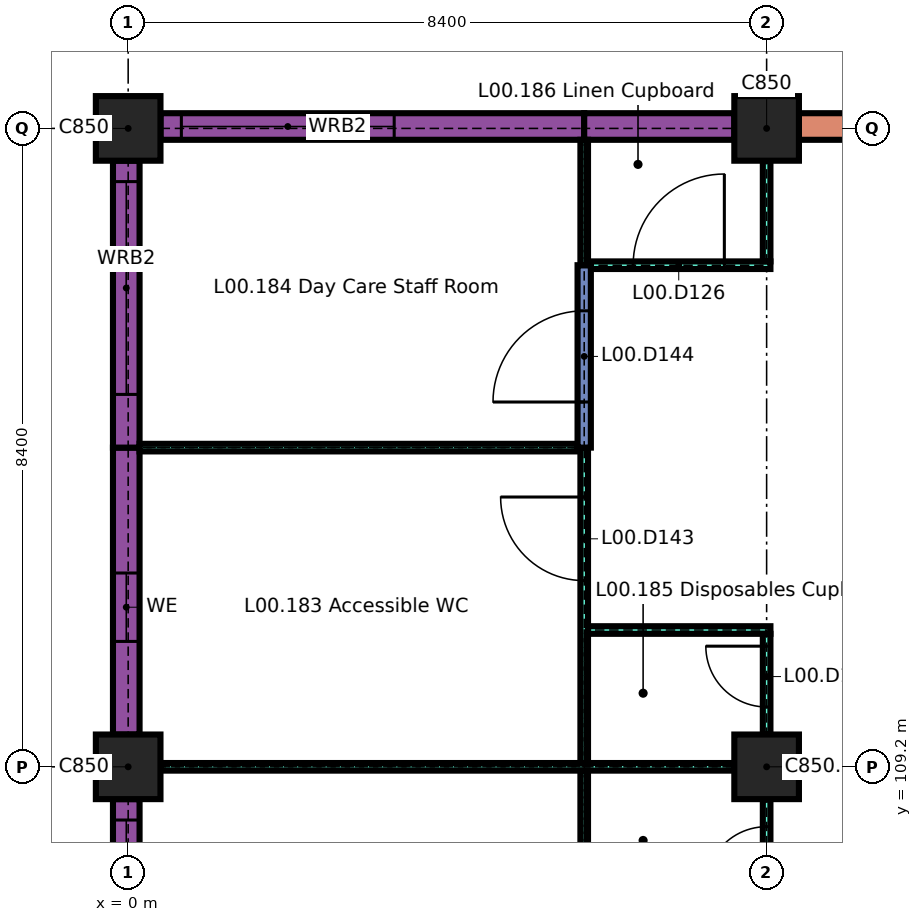
"""IFC4 building model, lengths in metres.
Left out: names, types, materials, properties, quantities, classifications, styles, units other than length and angle.
Written with IfcOpenShell. Run it as: python <this file> out.ifc"""

import sys

from ifc_helpers import new_model, si_unit, direction, frame, frame_2d, origin, origin_2d, place, context, subcontext, project, spatial, rectangle, extrude, element, fill, save


model = new_model("IFC4")
c1 = context("Model", 3, precision=1e-05, world=origin(), true_north=direction((0.0, 1.0)))
c2 = subcontext(c1, "Body", "Model", "MODEL_VIEW")
j1 = project(units=[si_unit("LENGTHUNIT", "METRE"), si_unit("PLANEANGLEUNIT", "RADIAN")], contexts=[c1])
p1 = place(None, origin())
s1 = spatial("IfcSite", under=j1, at=p1, CompositionType="ELEMENT")
p2 = place(p1, origin())
s2 = spatial("IfcBuilding", under=s1, at=p2, CompositionType="ELEMENT")
p3 = place(p2, origin())
s3 = spatial("IfcBuildingStorey", under=s2, at=p3, CompositionType="ELEMENT", Elevation=0.0)
for number, where, z_axis, x_axis in (
    (1, (0.0, 109.2, 0.0), (0.0, 0.0, 1.0), (1.0, 0.0, 0.0)),
    (2, (8.4, 109.2, 0.0), (0.0, 0.0, 1.0), (1.0, 0.0, 0.0)),
    (3, (0.0, 117.6, 0.0), (0.0, 0.0, 1.0), (1.0, 0.0, 0.0)),
    (4, (8.4, 117.6, 0.0), (0.0, 0.0, 1.0), (1.0, 0.0, 0.0)),
):
    element("IfcColumn", number, at=place(p3, frame(where, z_axis=z_axis, x_axis=x_axis)), inside=s3, PredefinedType="COLUMN", context=c2, shape_type="SweptSolid", body=[
        extrude(rectangle(XDim=0.85, YDim=0.85, at=origin_2d()), origin(), (0.0, 0.0, 1.0), 4.14),
    ])
p4 = place(p3, frame((0.425, 117.625, 0.0), z_axis=(0.0, 0.0, 1.0), x_axis=(1.0, 0.0, 0.0)))
e5 = element("IfcWall", 5, at=p4, inside=s3, PredefinedType="SOLIDWALL", context=c2, shape_type="SweptSolid", body=[
    extrude(rectangle(XDim=5.575, YDim=0.35, at=frame_2d((2.788, 0.0))), origin(), (0.0, 0.0, 1.0), 3.84),
])
p5 = place(p4, frame((0.275, 0.0, 1.0)))
e6 = element("IfcOpeningElement", 6, at=p5, cuts=e5, PredefinedType="OPENING", context=c2, shape_type="SweptSolid", body=[
    extrude(rectangle(XDim=2.8, YDim=1.5, at=frame_2d((1.4, 0.75))), frame((0.0, 0.185, 0.0), z_axis=(0.0, -1.0, 0.0), x_axis=(1.0, 0.0, 0.0)), (0.0, 0.0, 1.0), 0.37),
])
p6 = place(p3, frame((6.0, 117.625, 0.0), z_axis=(0.0, 0.0, 1.0), x_axis=(1.0, 0.0, 0.0)))
e7 = element("IfcWall", 7, at=p6, inside=s3, PredefinedType="SOLIDWALL", context=c2, shape_type="SweptSolid", body=[
    extrude(rectangle(XDim=1.975, YDim=0.35, at=frame_2d((0.988, 0.0))), origin(), (0.0, 0.0, 1.0), 3.84),
])
p7 = place(p3, frame((8.825, 117.625, 0.0), z_axis=(0.0, 0.0, 1.0), x_axis=(1.0, 0.0, 0.0)))
e8 = element("IfcWall", 8, at=p7, inside=s3, PredefinedType="SOLIDWALL", context=c2, shape_type="SweptSolid", body=[
    extrude(rectangle(XDim=2.575, YDim=0.35, at=frame_2d((1.288, 0.0))), origin(), (0.0, 0.0, 1.0), 4.14),
])
p8 = place(p7, frame((1.225, 0.0, 0.9)))
e9 = element("IfcOpeningElement", 9, at=p8, cuts=e8, PredefinedType="OPENING", context=c2, shape_type="SweptSolid", body=[
    extrude(rectangle(XDim=0.9, YDim=2.1, at=frame_2d((0.45, 1.05))), frame((0.0, 0.185, 0.0), z_axis=(0.0, -1.0, 0.0), x_axis=(1.0, 0.0, 0.0)), (0.0, 0.0, 1.0), 0.37),
])
p9 = place(p3, frame((-0.025, 105.0, 0.0), z_axis=(0.0, 0.0, 1.0), x_axis=(0.0, 1.0, 0.0)))
e10 = element("IfcWall", 10, at=p9, inside=s3, PredefinedType="SOLIDWALL", context=c2, shape_type="SweptSolid", body=[
    extrude(rectangle(XDim=3.775, YDim=0.35, at=frame_2d((1.887, 0.0))), origin(), (0.0, 0.0, 1.0), 3.84),
])
p10 = place(p9, frame((0.7, 0.0, 1.0)))
e11 = element("IfcOpeningElement", 11, at=p10, cuts=e10, PredefinedType="OPENING", context=c2, shape_type="SweptSolid", body=[
    extrude(rectangle(XDim=2.8, YDim=1.5, at=frame_2d((1.4, 0.75))), frame((0.0, 0.185, 0.0), z_axis=(0.0, -1.0, 0.0), x_axis=(1.0, 0.0, 0.0)), (0.0, 0.0, 1.0), 0.37),
])
p11 = place(p3, frame((-0.025, 109.625, 0.0), z_axis=(0.0, 0.0, 1.0), x_axis=(0.0, 1.0, 0.0)))
e12 = element("IfcWall", 12, at=p11, inside=s3, PredefinedType="SOLIDWALL", context=c2, shape_type="SweptSolid", body=[
    extrude(rectangle(XDim=3.775, YDim=0.35, at=frame_2d((1.887, 0.0))), origin(), (0.0, 0.0, 1.0), 3.84),
])
p12 = place(p11, frame((1.225, 0.0, 1.5)))
e13 = element("IfcOpeningElement", 13, at=p12, cuts=e12, PredefinedType="OPENING", context=c2, shape_type="SweptSolid", body=[
    extrude(rectangle(XDim=0.9, YDim=0.6, at=frame_2d((0.45, 0.3))), frame((0.0, 0.185, 0.0), z_axis=(0.0, -1.0, 0.0), x_axis=(1.0, 0.0, 0.0)), (0.0, 0.0, 1.0), 0.37),
])
p13 = place(p3, frame((-0.025, 113.4, 0.0), z_axis=(0.0, 0.0, 1.0), x_axis=(0.0, 1.0, 0.0)))
e14 = element("IfcWall", 14, at=p13, inside=s3, PredefinedType="SOLIDWALL", context=c2, shape_type="SweptSolid", body=[
    extrude(rectangle(XDim=3.775, YDim=0.35, at=frame_2d((1.888, 0.0))), origin(), (0.0, 0.0, 1.0), 3.84),
])
p14 = place(p13, frame((0.7, 0.0, 1.0)))
e15 = element("IfcOpeningElement", 15, at=p14, cuts=e14, PredefinedType="OPENING", context=c2, shape_type="SweptSolid", body=[
    extrude(rectangle(XDim=2.8, YDim=1.5, at=frame_2d((1.4, 0.75))), frame((0.0, 0.185, 0.0), z_axis=(0.0, -1.0, 0.0), x_axis=(1.0, 0.0, 0.0)), (0.0, 0.0, 1.0), 0.37),
])
p15 = place(p3, frame((0.425, 109.2, 0.0), z_axis=(0.0, 0.0, 1.0), x_axis=(1.0, 0.0, 0.0)))
e16 = element("IfcWall", 16, at=p15, inside=s3, PredefinedType="PARTITIONING", context=c2, shape_type="SweptSolid", body=[
    extrude(rectangle(XDim=7.55, YDim=0.1, at=frame_2d((3.775, 0.0))), origin(), (0.0, 0.0, 1.0), 4.14),
])
p16 = place(p3, frame((6.05, 111.0, 0.0), z_axis=(0.0, 0.0, 1.0), x_axis=(1.0, 0.0, 0.0)))
e17 = element("IfcWall", 17, at=p16, inside=s3, PredefinedType="PARTITIONING", context=c2, shape_type="SweptSolid", body=[
    extrude(rectangle(XDim=2.4, YDim=0.1, at=frame_2d((1.2, 0.0))), origin(), (0.0, 0.0, 1.0), 4.14),
])
p17 = place(p3, frame((0.15, 113.4, 0.0), z_axis=(0.0, 0.0, 1.0), x_axis=(1.0, 0.0, 0.0)))
e18 = element("IfcWall", 18, at=p17, inside=s3, PredefinedType="PARTITIONING", context=c2, shape_type="SweptSolid", body=[
    extrude(rectangle(XDim=5.763, YDim=0.1, at=frame_2d((2.881, 0.0))), origin(), (0.0, 0.0, 1.0), 4.14),
])
p18 = place(p3, frame((6.087, 115.8, 0.0), z_axis=(0.0, 0.0, 1.0), x_axis=(1.0, 0.0, 0.0)))
e19 = element("IfcWall", 19, at=p18, inside=s3, PredefinedType="PARTITIONING", context=c2, shape_type="SweptSolid", body=[
    extrude(rectangle(XDim=2.363, YDim=0.1, at=frame_2d((1.181, 0.0))), origin(), (0.0, 0.0, 1.0), 4.14),
])
p19 = place(p18, frame((0.556, 0.0, 0.0)))
e20 = element("IfcOpeningElement", 20, at=p19, cuts=e19, PredefinedType="OPENING", context=c2, shape_type="SweptSolid", body=[
    extrude(rectangle(XDim=1.2, YDim=2.1, at=frame_2d((0.6, 1.05))), frame((0.0, 0.06, 0.0), z_axis=(0.0, -1.0, 0.0), x_axis=(1.0, 0.0, 0.0)), (0.0, 0.0, 1.0), 0.12),
])
p20 = place(p3, frame((6.0, 107.4, 0.0), z_axis=(0.0, 0.0, 1.0), x_axis=(0.0, 1.0, 0.0)))
e21 = element("IfcWall", 21, at=p20, inside=s3, PredefinedType="PARTITIONING", context=c2, shape_type="SweptSolid", body=[
    extrude(rectangle(XDim=1.75, YDim=0.1, at=frame_2d((0.875, 0.0))), origin(), (0.0, 0.0, 1.0), 4.14),
])
p21 = place(p3, frame((6.0, 109.25, 0.0), z_axis=(0.0, 0.0, 1.0), x_axis=(0.0, 1.0, 0.0)))
e22 = element("IfcWall", 22, at=p21, inside=s3, PredefinedType="PARTITIONING", context=c2, shape_type="SweptSolid", body=[
    extrude(rectangle(XDim=4.15, YDim=0.1, at=frame_2d((2.075, 0.0))), origin(), (0.0, 0.0, 1.0), 4.14),
])
p22 = place(p21, frame((2.4, 0.0, 0.0)))
e23 = element("IfcOpeningElement", 23, at=p22, cuts=e22, PredefinedType="OPENING", context=c2, shape_type="SweptSolid", body=[
    extrude(rectangle(XDim=1.1, YDim=2.1, at=frame_2d((0.55, 1.05))), frame((0.0, 0.06, 0.0), z_axis=(0.0, -1.0, 0.0), x_axis=(1.0, 0.0, 0.0)), (0.0, 0.0, 1.0), 0.12),
])
p23 = place(p3, frame((6.0, 113.4, 0.0), z_axis=(0.0, 0.0, 1.0), x_axis=(0.0, 1.0, 0.0)))
e24 = element("IfcWall", 24, at=p23, inside=s3, PredefinedType="PARTITIONING", context=c2, shape_type="SweptSolid", body=[
    extrude(rectangle(XDim=2.4, YDim=0.175, at=frame_2d((1.2, 0.0))), origin(), (0.0, 0.0, 1.0), 4.14),
])
p24 = place(p23, frame((0.6, 0.0, 0.0)))
e25 = element("IfcOpeningElement", 25, at=p24, cuts=e24, PredefinedType="OPENING", context=c2, shape_type="SweptSolid", body=[
    extrude(rectangle(XDim=1.2, YDim=2.1, at=frame_2d((0.6, 1.05))), frame((0.0, 0.097, 0.0), z_axis=(0.0, -1.0, 0.0), x_axis=(1.0, 0.0, 0.0)), (0.0, 0.0, 1.0), 0.195),
])
p25 = place(p3, frame((6.0, 115.8, 0.0), z_axis=(0.0, 0.0, 1.0), x_axis=(0.0, 1.0, 0.0)))
e26 = element("IfcWall", 26, at=p25, inside=s3, PredefinedType="PARTITIONING", context=c2, shape_type="SweptSolid", body=[
    extrude(rectangle(XDim=1.65, YDim=0.1, at=frame_2d((0.825, 0.0))), origin(), (0.0, 0.0, 1.0), 4.14),
])
p26 = place(p3, frame((8.4, 107.45, 0.0), z_axis=(0.0, 0.0, 1.0), x_axis=(0.0, 1.0, 0.0)))
e27 = element("IfcWall", 27, at=p26, inside=s3, PredefinedType="PARTITIONING", context=c2, shape_type="SweptSolid", body=[
    extrude(rectangle(XDim=1.325, YDim=0.1, at=frame_2d((0.663, 0.0))), origin(), (0.0, 0.0, 1.0), 4.14),
])
p27 = place(p26, frame((0.163, 0.0, 0.0)))
e28 = element("IfcOpeningElement", 28, at=p27, cuts=e27, PredefinedType="OPENING", context=c2, shape_type="SweptSolid", body=[
    extrude(rectangle(XDim=0.8, YDim=2.1, at=frame_2d((0.4, 1.05))), frame((0.0, 0.06, 0.0), z_axis=(0.0, -1.0, 0.0), x_axis=(1.0, 0.0, 0.0)), (0.0, 0.0, 1.0), 0.12),
])
p28 = place(p3, frame((8.4, 109.625, 0.0), z_axis=(0.0, 0.0, 1.0), x_axis=(0.0, 1.0, 0.0)))
e29 = element("IfcWall", 29, at=p28, inside=s3, PredefinedType="PARTITIONING", context=c2, shape_type="SweptSolid", body=[
    extrude(rectangle(XDim=1.325, YDim=0.1, at=frame_2d((0.663, 0.0))), origin(), (0.0, 0.0, 1.0), 4.14),
])
p29 = place(p28, frame((0.363, 0.0, 0.0)))
e30 = element("IfcOpeningElement", 30, at=p29, cuts=e29, PredefinedType="OPENING", context=c2, shape_type="SweptSolid", body=[
    extrude(rectangle(XDim=0.8, YDim=2.1, at=frame_2d((0.4, 1.05))), frame((0.0, 0.06, 0.0), z_axis=(0.0, -1.0, 0.0), x_axis=(1.0, 0.0, 0.0)), (0.0, 0.0, 1.0), 0.12),
])
p30 = place(p3, frame((8.4, 115.85, 0.0), z_axis=(0.0, 0.0, 1.0), x_axis=(0.0, 1.0, 0.0)))
e31 = element("IfcWall", 31, at=p30, inside=s3, PredefinedType="PARTITIONING", context=c2, shape_type="SweptSolid", body=[
    extrude(rectangle(XDim=1.325, YDim=0.1, at=frame_2d((0.663, 0.0))), origin(), (0.0, 0.0, 1.0), 4.14),
])
p31 = place(p5, origin())
e32 = element("IfcWindow", 32, at=p31, inside=s3, PartitioningType="DOUBLE_PANEL_VERTICAL", PredefinedType="WINDOW", context=c2, shape_type="SweptSolid", body=[
    extrude(rectangle(XDim=2.8, YDim=1.5, at=frame_2d((1.4, 0.75))), frame((0.0, 0.03, 0.0), z_axis=(0.0, -1.0, 0.0), x_axis=(1.0, 0.0, 0.0)), (0.0, 0.0, 1.0), 0.06),
])
fill(e6, e32)
p32 = place(p10, origin())
e33 = element("IfcWindow", 33, at=p32, inside=s3, PartitioningType="DOUBLE_PANEL_VERTICAL", PredefinedType="WINDOW", context=c2, shape_type="SweptSolid", body=[
    extrude(rectangle(XDim=2.8, YDim=1.5, at=frame_2d((1.4, 0.75))), frame((0.0, 0.03, 0.0), z_axis=(0.0, -1.0, 0.0), x_axis=(1.0, 0.0, 0.0)), (0.0, 0.0, 1.0), 0.06),
])
fill(e11, e33)
p33 = place(p12, origin())
e34 = element("IfcWindow", 34, at=p33, inside=s3, PartitioningType="SINGLE_PANEL", PredefinedType="WINDOW", context=c2, shape_type="SweptSolid", body=[
    extrude(rectangle(XDim=0.9, YDim=0.6, at=frame_2d((0.45, 0.3))), frame((0.0, 0.03, 0.0), z_axis=(0.0, -1.0, 0.0), x_axis=(1.0, 0.0, 0.0)), (0.0, 0.0, 1.0), 0.06),
])
fill(e13, e34)
p34 = place(p14, origin())
e35 = element("IfcWindow", 35, at=p34, inside=s3, PartitioningType="DOUBLE_PANEL_VERTICAL", PredefinedType="WINDOW", context=c2, shape_type="SweptSolid", body=[
    extrude(rectangle(XDim=2.8, YDim=1.5, at=frame_2d((1.4, 0.75))), frame((0.0, 0.03, 0.0), z_axis=(0.0, -1.0, 0.0), x_axis=(1.0, 0.0, 0.0)), (0.0, 0.0, 1.0), 0.06),
])
fill(e15, e35)
p35 = place(p19, origin())
e36 = element("IfcDoor", 36, at=p35, inside=s3, OperationType="SINGLE_SWING_LEFT", PredefinedType="DOOR", context=c2, shape_type="SweptSolid", body=[
    extrude(rectangle(XDim=1.2, YDim=2.1, at=frame_2d((0.6, 1.05))), frame((0.0, 0.02, 0.0), z_axis=(0.0, -1.0, 0.0), x_axis=(1.0, 0.0, 0.0)), (0.0, 0.0, 1.0), 0.04),
])
fill(e20, e36)
p36 = place(p22, origin())
e37 = element("IfcDoor", 37, at=p36, inside=s3, OperationType="SINGLE_SWING_LEFT", PredefinedType="DOOR", context=c2, shape_type="SweptSolid", body=[
    extrude(rectangle(XDim=1.1, YDim=2.1, at=frame_2d((0.55, 1.05))), frame((0.0, 0.025, 0.0), z_axis=(0.0, -1.0, 0.0), x_axis=(1.0, 0.0, 0.0)), (0.0, 0.0, 1.0), 0.05),
])
fill(e23, e37)
p37 = place(p24, origin())
e38 = element("IfcDoor", 38, at=p37, inside=s3, OperationType="SINGLE_SWING_RIGHT", PredefinedType="DOOR", context=c2, shape_type="SweptSolid", body=[
    extrude(rectangle(XDim=1.2, YDim=2.1, at=frame_2d((0.6, 1.05))), frame((0.0, 0.035, 0.0), z_axis=(0.0, -1.0, 0.0), x_axis=(1.0, 0.0, 0.0)), (0.0, 0.0, 1.0), 0.07),
])
fill(e25, e38)
p38 = place(p27, origin())
e39 = element("IfcDoor", 39, at=p38, inside=s3, OperationType="SINGLE_SWING_RIGHT", PredefinedType="DOOR", context=c2, shape_type="SweptSolid", body=[
    extrude(rectangle(XDim=0.8, YDim=2.1, at=frame_2d((0.4, 1.05))), frame((0.0, 0.02, 0.0), z_axis=(0.0, -1.0, 0.0), x_axis=(1.0, 0.0, 0.0)), (0.0, 0.0, 1.0), 0.04),
])
fill(e28, e39)
p39 = place(p29, origin())
e40 = element("IfcDoor", 40, at=p39, inside=s3, OperationType="SINGLE_SWING_LEFT", PredefinedType="DOOR", context=c2, shape_type="SweptSolid", body=[
    extrude(rectangle(XDim=0.8, YDim=2.1, at=frame_2d((0.4, 1.05))), frame((0.0, 0.02, 0.0), z_axis=(0.0, -1.0, 0.0), x_axis=(1.0, 0.0, 0.0)), (0.0, 0.0, 1.0), 0.04),
])
fill(e30, e40)
save(model, sys.argv[1])
